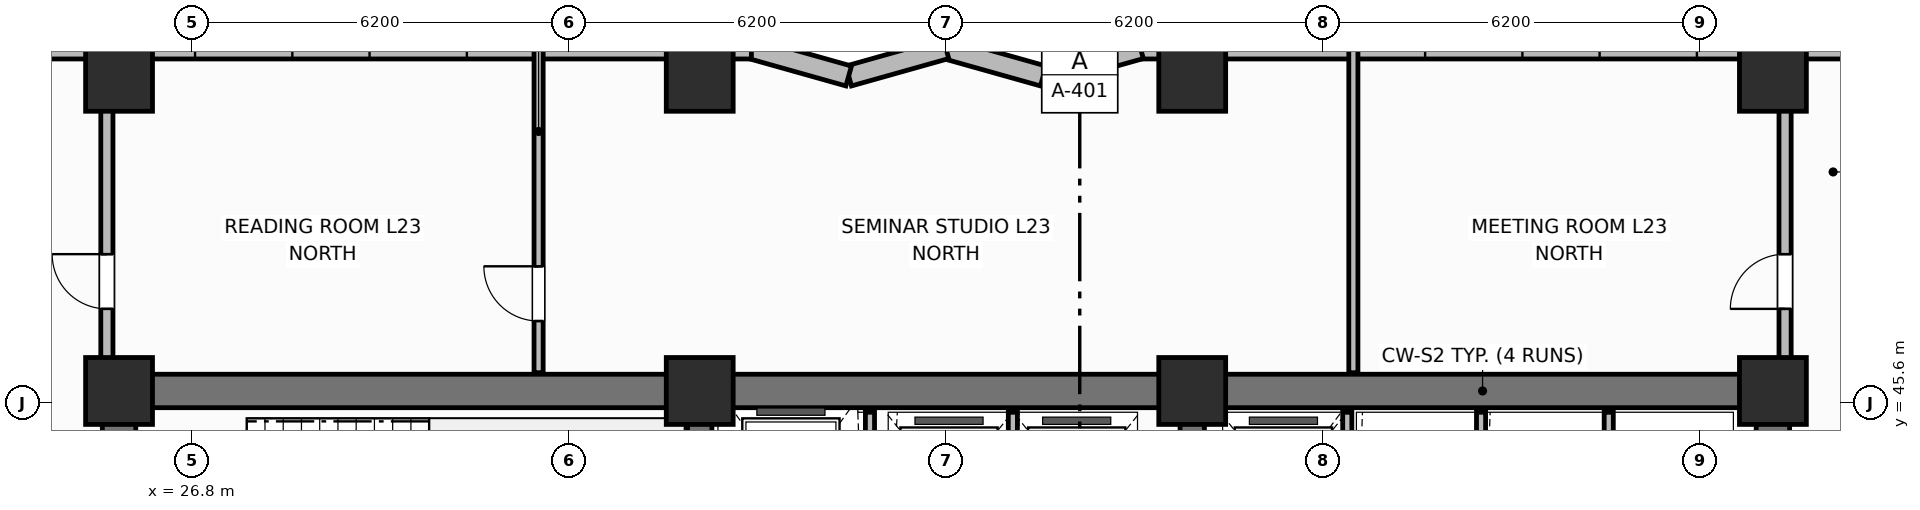
"""IFC4 building model, lengths in metres.
Left out: names, types, materials, properties, quantities, classifications, styles, units other than length and angle.
Written with IfcOpenShell. Run it as: python <this file> out.ifc"""

import sys

from ifc_helpers import new_model, si_unit, direction, frame, frame_2d, origin, origin_2d, place, context, subcontext, project, spatial, rectangle, extrude, element, fill, save


model = new_model("IFC4")
c1 = context("Model", 3, precision=1e-05, world=origin(), true_north=direction((0.0, 1.0)))
c2 = subcontext(c1, "Body", "Model", "MODEL_VIEW")
j1 = project(units=[si_unit("LENGTHUNIT", "METRE"), si_unit("PLANEANGLEUNIT", "RADIAN")], contexts=[c1])
p1 = place(None, origin())
s1 = spatial("IfcSite", under=j1, at=p1, CompositionType="ELEMENT")
p2 = place(p1, origin())
s2 = spatial("IfcBuilding", under=s1, at=p2, CompositionType="ELEMENT")
p3 = place(p2, frame((0.0, 0.0, 95.7)))
s3 = spatial("IfcBuildingStorey", under=s2, at=p3, CompositionType="ELEMENT", Elevation=95.7)
p4 = place(p3, frame((25.6, 45.8, 0.0), z_axis=(0.0, 0.0, 1.0), x_axis=(1.0, 0.0, 0.0)))
e1 = element("IfcWall", 1, at=p4, inside=s3, PredefinedType="SHEAR", context=c2, shape_type="SweptSolid", body=[
    extrude(rectangle(XDim=27.2, YDim=0.55, at=frame_2d((13.6, 0.0))), origin(), (0.0, 0.0, 1.0), 3.7),
])
for number, where, z_axis, x_axis in (
    (2, (25.6, 39.875, 0.0), (0.0, 0.0, 1.0), (0.0, 1.0, 0.0)),
    (3, (52.8, 39.875, 0.0), (0.0, 0.0, 1.0), (0.0, 1.0, 0.0)),
):
    element("IfcWall", number, at=place(p3, frame(where, z_axis=z_axis, x_axis=x_axis)), inside=s3, PredefinedType="SHEAR", context=c2, shape_type="SweptSolid", body=[
        extrude(rectangle(XDim=5.65, YDim=0.55, at=frame_2d((2.825, 0.0))), origin(), (0.0, 0.0, 1.0), 3.7),
    ])
for number, where, z_axis, x_axis in (
    (4, (35.15, 39.875, 0.0), (0.0, 0.0, 1.0), (0.0, 1.0, 0.0)),
    (5, (43.25, 39.875, 0.0), (0.0, 0.0, 1.0), (0.0, 1.0, 0.0)),
):
    element("IfcWall", number, at=place(p3, frame(where, z_axis=z_axis, x_axis=x_axis)), inside=s3, PredefinedType="SHEAR", context=c2, shape_type="SweptSolid", body=[
        extrude(rectangle(XDim=5.65, YDim=0.4, at=frame_2d((2.825, 0.0))), origin(), (0.0, 0.0, 1.0), 3.7),
    ])
for number, where, z_axis, x_axis in (
    (6, (25.6, 45.8, 0.0), (0.0, 0.0, 1.0), (1.0, 0.0, 0.0)),
    (7, (35.15, 45.8, 0.0), (0.0, 0.0, 1.0), (1.0, 0.0, 0.0)),
    (8, (43.25, 45.8, 0.0), (0.0, 0.0, 1.0), (1.0, 0.0, 0.0)),
    (9, (52.8, 45.8, 0.0), (0.0, 0.0, 1.0), (1.0, 0.0, 0.0)),
    (10, (25.6, 50.95, 0.0), (0.0, 0.0, 1.0), (1.0, 0.0, 0.0)),
    (11, (35.15, 50.95, 0.0), (0.0, 0.0, 1.0), (1.0, 0.0, 0.0)),
    (12, (43.25, 50.95, 0.0), (0.0, 0.0, 1.0), (1.0, 0.0, 0.0)),
    (13, (52.8, 50.95, 0.0), (0.0, 0.0, 1.0), (1.0, 0.0, 0.0)),
):
    element("IfcColumn", number, at=place(p3, frame(where, z_axis=z_axis, x_axis=x_axis)), inside=s3, PredefinedType="COLUMN", context=c2, shape_type="SweptSolid", body=[
        extrude(rectangle(XDim=1.1, YDim=1.1, at=origin_2d()), origin(), (0.0, 0.0, 1.0), 3.7),
    ])
p5 = place(p3, frame((59.8, 51.43, 0.0), z_axis=(0.0, 0.0, 1.0), x_axis=(-1.0, 0.0, 0.0)))
e14 = element("IfcWall", 14, at=p5, inside=s3, PredefinedType="SOLIDWALL", context=c2, shape_type="SweptSolid", body=[
    extrude(rectangle(XDim=17.4, YDim=0.34, at=frame_2d((8.7, 0.0))), origin(), (0.0, 0.0, 1.0), 2.7),
])
p6 = place(p5, frame((1.46, 0.0, 0.68)))
e15 = element("IfcOpeningElement", 15, at=p6, cuts=e14, PredefinedType="OPENING", context=c2, shape_type="SweptSolid", body=[
    extrude(rectangle(XDim=1.6, YDim=1.9, at=frame_2d((0.8, 0.95))), frame((0.0, 0.18, 0.0), z_axis=(0.0, -1.0, 0.0), x_axis=(1.0, 0.0, 0.0)), (0.0, 0.0, 1.0), 0.36),
])
p7 = place(p5, frame((8.25, 0.0, 0.68)))
e16 = element("IfcOpeningElement", 16, at=p7, cuts=e14, PredefinedType="OPENING", context=c2, shape_type="SweptSolid", body=[
    extrude(rectangle(XDim=1.6, YDim=1.9, at=frame_2d((0.8, 0.95))), frame((0.0, 0.18, 0.0), z_axis=(0.0, -1.0, 0.0), x_axis=(1.0, 0.0, 0.0)), (0.0, 0.0, 1.0), 0.36),
])
p8 = place(p5, frame((11.12, 0.0, 0.68)))
e17 = element("IfcOpeningElement", 17, at=p8, cuts=e14, PredefinedType="OPENING", context=c2, shape_type="SweptSolid", body=[
    extrude(rectangle(XDim=1.6, YDim=1.9, at=frame_2d((0.8, 0.95))), frame((0.0, 0.18, 0.0), z_axis=(0.0, -1.0, 0.0), x_axis=(1.0, 0.0, 0.0)), (0.0, 0.0, 1.0), 0.36),
])
p9 = place(p3, frame((42.4, 51.43, 0.0), z_axis=(0.0, 0.0, 1.0), x_axis=(-0.962652136636, -0.270741322725, 0.0)))
e18 = element("IfcWall", 18, at=p9, inside=s3, PredefinedType="SOLIDWALL", context=c2, shape_type="SweptSolid", body=[
    extrude(rectangle(XDim=1.662, YDim=0.34, at=frame_2d((0.831, 0.0))), origin(), (0.0, 0.0, 1.0), 2.7),
])
p10 = place(p3, frame((40.8, 50.98, 0.0), z_axis=(0.0, 0.0, 1.0), x_axis=(-0.962662902433, 0.270703040766, 0.0)))
e19 = element("IfcWall", 19, at=p10, inside=s3, PredefinedType="SOLIDWALL", context=c2, shape_type="SweptSolid", body=[
    extrude(rectangle(XDim=1.662, YDim=0.34, at=frame_2d((0.831, 0.0))), origin(), (0.0, 0.0, 1.0), 2.7),
])
p11 = place(p3, frame((39.2, 51.43, 0.0), z_axis=(0.0, 0.0, 1.0), x_axis=(-0.962652136636, -0.270741322725, 0.0)))
e20 = element("IfcWall", 20, at=p11, inside=s3, PredefinedType="SOLIDWALL", context=c2, shape_type="SweptSolid", body=[
    extrude(rectangle(XDim=1.662, YDim=0.34, at=frame_2d((0.831, 0.0))), origin(), (0.0, 0.0, 1.0), 2.7),
])
p12 = place(p3, frame((37.6, 50.98, 0.0), z_axis=(0.0, 0.0, 1.0), x_axis=(-0.962662902433, 0.270703040766, 0.0)))
e21 = element("IfcWall", 21, at=p12, inside=s3, PredefinedType="SOLIDWALL", context=c2, shape_type="SweptSolid", body=[
    extrude(rectangle(XDim=1.662, YDim=0.34, at=frame_2d((0.831, 0.0))), origin(), (0.0, 0.0, 1.0), 2.7),
])
p13 = place(p3, frame((36.0, 51.43, 0.0), z_axis=(0.0, 0.0, 1.0), x_axis=(-1.0, 0.0, 0.0)))
e22 = element("IfcWall", 22, at=p13, inside=s3, PredefinedType="SOLIDWALL", context=c2, shape_type="SweptSolid", body=[
    extrude(rectangle(XDim=17.4, YDim=0.34, at=frame_2d((8.7, 0.0))), origin(), (0.0, 0.0, 1.0), 2.7),
])
p14 = place(p13, frame((4.68, 0.0, 0.68)))
e23 = element("IfcOpeningElement", 23, at=p14, cuts=e22, PredefinedType="OPENING", context=c2, shape_type="SweptSolid", body=[
    extrude(rectangle(XDim=1.6, YDim=1.9, at=frame_2d((0.8, 0.95))), frame((0.0, 0.18, 0.0), z_axis=(0.0, -1.0, 0.0), x_axis=(1.0, 0.0, 0.0)), (0.0, 0.0, 1.0), 0.36),
])
p15 = place(p13, frame((7.55, 0.0, 0.68)))
e24 = element("IfcOpeningElement", 24, at=p15, cuts=e22, PredefinedType="OPENING", context=c2, shape_type="SweptSolid", body=[
    extrude(rectangle(XDim=1.6, YDim=1.9, at=frame_2d((0.8, 0.95))), frame((0.0, 0.18, 0.0), z_axis=(0.0, -1.0, 0.0), x_axis=(1.0, 0.0, 0.0)), (0.0, 0.0, 1.0), 0.36),
])
p16 = place(p13, frame((14.34, 0.0, 0.68)))
e25 = element("IfcOpeningElement", 25, at=p16, cuts=e22, PredefinedType="OPENING", context=c2, shape_type="SweptSolid", body=[
    extrude(rectangle(XDim=1.6, YDim=1.9, at=frame_2d((0.8, 0.95))), frame((0.0, 0.18, 0.0), z_axis=(0.0, -1.0, 0.0), x_axis=(1.0, 0.0, 0.0)), (0.0, 0.0, 1.0), 0.36),
])
p17 = place(p3, frame((37.95, 42.6, 0.0), z_axis=(0.0, 0.0, 1.0), x_axis=(0.0, 1.0, 0.0)))
e26 = element("IfcWall", 26, at=p17, inside=s3, PredefinedType="PARTITIONING", context=c2, shape_type="SweptSolid", body=[
    extrude(rectangle(XDim=2.85, YDim=0.15, at=frame_2d((1.425, 0.0))), origin(), (0.0, 0.0, 1.0), 2.53),
])
for number, where, z_axis, x_axis in (
    (27, (40.3, 42.65, 0.0), (0.0, 0.0, 1.0), (0.0, 1.0, 0.0)),
    (28, (45.8, 42.65, 0.0), (0.0, 0.0, 1.0), (0.0, 1.0, 0.0)),
    (29, (48.0, 42.65, 0.0), (0.0, 0.0, 1.0), (0.0, 1.0, 0.0)),
    (30, (50.1, 42.65, 0.0), (0.0, 0.0, 1.0), (0.0, 1.0, 0.0)),
):
    element("IfcWall", number, at=place(p3, frame(where, z_axis=z_axis, x_axis=x_axis)), inside=s3, PredefinedType="PARTITIONING", context=c2, shape_type="SweptSolid", body=[
        extrude(rectangle(XDim=2.8, YDim=0.15, at=frame_2d((1.4, 0.0))), origin(), (0.0, 0.0, 1.0), 2.53),
    ])
p18 = place(p3, frame((32.5, 46.1, 0.0), z_axis=(0.0, 0.0, 1.0), x_axis=(0.0, 1.0, 0.0)))
e31 = element("IfcWall", 31, at=p18, inside=s3, PredefinedType="PARTITIONING", context=c2, shape_type="SweptSolid", body=[
    extrude(rectangle(XDim=5.33, YDim=0.15, at=frame_2d((2.665, 0.0))), origin(), (0.0, 0.0, 1.0), 2.53),
])
p19 = place(p18, frame((0.85, 0.0, 0.0)))
e32 = element("IfcOpeningElement", 32, at=p19, cuts=e31, PredefinedType="OPENING", context=c2, shape_type="SweptSolid", body=[
    extrude(rectangle(XDim=0.9, YDim=2.1, at=frame_2d((0.45, 1.05))), frame((0.0, 0.085, 0.0), z_axis=(0.0, -1.0, 0.0), x_axis=(1.0, 0.0, 0.0)), (0.0, 0.0, 1.0), 0.17),
])
p20 = place(p3, frame((45.9, 46.1, 0.0), z_axis=(0.0, 0.0, 1.0), x_axis=(0.0, 1.0, 0.0)))
e33 = element("IfcWall", 33, at=p20, inside=s3, PredefinedType="PARTITIONING", context=c2, shape_type="SweptSolid", body=[
    extrude(rectangle(XDim=5.33, YDim=0.15, at=frame_2d((2.665, 0.0))), origin(), (0.0, 0.0, 1.0), 2.53),
])
p21 = place(p3, frame((25.4, 46.1, 0.0), z_axis=(0.0, 0.0, 1.0), x_axis=(0.0, 1.0, 0.0)))
e34 = element("IfcWall", 34, at=p21, inside=s3, PredefinedType="PARTITIONING", context=c2, shape_type="SweptSolid", body=[
    extrude(rectangle(XDim=4.33, YDim=0.2, at=frame_2d((2.165, 0.0))), origin(), (0.0, 0.0, 1.0), 2.53),
])
p22 = place(p21, frame((1.05, 0.0, 0.0)))
e35 = element("IfcOpeningElement", 35, at=p22, cuts=e34, PredefinedType="OPENING", context=c2, shape_type="SweptSolid", body=[
    extrude(rectangle(XDim=0.9, YDim=2.1, at=frame_2d((0.45, 1.05))), frame((0.0, 0.11, 0.0), z_axis=(0.0, -1.0, 0.0), x_axis=(1.0, 0.0, 0.0)), (0.0, 0.0, 1.0), 0.22),
])
p23 = place(p3, frame((53.0, 46.1, 0.0), z_axis=(0.0, 0.0, 1.0), x_axis=(0.0, 1.0, 0.0)))
e36 = element("IfcWall", 36, at=p23, inside=s3, PredefinedType="PARTITIONING", context=c2, shape_type="SweptSolid", body=[
    extrude(rectangle(XDim=4.33, YDim=0.2, at=frame_2d((2.165, 0.0))), origin(), (0.0, 0.0, 1.0), 2.53),
])
p24 = place(p23, frame((1.05, 0.0, 0.0)))
e37 = element("IfcOpeningElement", 37, at=p24, cuts=e36, PredefinedType="OPENING", context=c2, shape_type="SweptSolid", body=[
    extrude(rectangle(XDim=0.9, YDim=2.1, at=frame_2d((0.45, 1.05))), frame((0.0, 0.11, 0.0), z_axis=(0.0, -1.0, 0.0), x_axis=(1.0, 0.0, 0.0)), (0.0, 0.0, 1.0), 0.22),
])
p25 = place(p19, origin())
e38 = element("IfcDoor", 38, at=p25, inside=s3, OperationType="SINGLE_SWING_RIGHT", PredefinedType="DOOR", context=c2, shape_type="SweptSolid", body=[
    extrude(rectangle(XDim=0.9, YDim=2.1, at=frame_2d((0.45, 1.05))), frame((0.0, 0.025, 0.0), z_axis=(0.0, -1.0, 0.0), x_axis=(1.0, 0.0, 0.0)), (0.0, 0.0, 1.0), 0.05),
])
fill(e32, e38)
p26 = place(p22, origin())
e39 = element("IfcDoor", 39, at=p26, inside=s3, OperationType="SINGLE_SWING_RIGHT", PredefinedType="DOOR", context=c2, shape_type="SweptSolid", body=[
    extrude(rectangle(XDim=0.9, YDim=2.1, at=frame_2d((0.45, 1.05))), frame((0.0, 0.025, 0.0), z_axis=(0.0, -1.0, 0.0), x_axis=(1.0, 0.0, 0.0)), (0.0, 0.0, 1.0), 0.05),
])
fill(e35, e39)
p27 = place(p24, origin())
e40 = element("IfcDoor", 40, at=p27, inside=s3, OperationType="SINGLE_SWING_LEFT", PredefinedType="DOOR", context=c2, shape_type="SweptSolid", body=[
    extrude(rectangle(XDim=0.9, YDim=2.1, at=frame_2d((0.45, 1.05))), frame((0.0, 0.025, 0.0), z_axis=(0.0, -1.0, 0.0), x_axis=(1.0, 0.0, 0.0)), (0.0, 0.0, 1.0), 0.05),
])
fill(e37, e40)
save(model, sys.argv[1])
